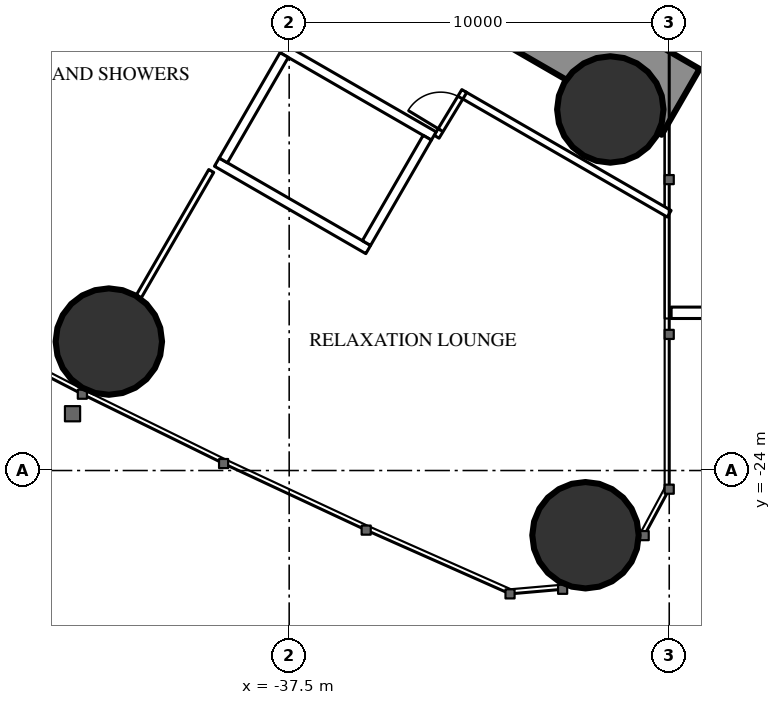
"""IFC4 building model, lengths in metres.
Left out: names, types, materials, properties, quantities, classifications, styles, units other than length and angle.
Written with IfcOpenShell. Run it as: python <this file> out.ifc"""

import sys

from ifc_helpers import new_model, si_unit, direction, frame, frame_2d, origin, origin_2d, place, context, subcontext, project, spatial, rectangle, hollow_circle, extrude, element, fill, save


model = new_model("IFC4")
c1 = context("Model", 3, precision=1e-05, world=origin(), true_north=direction((0.0, 1.0)))
c2 = subcontext(c1, "Body", "Model", "MODEL_VIEW")
j1 = project(units=[si_unit("LENGTHUNIT", "METRE"), si_unit("PLANEANGLEUNIT", "RADIAN")], contexts=[c1])
p1 = place(None, origin())
s1 = spatial("IfcSite", under=j1, at=p1, CompositionType="ELEMENT")
p2 = place(p1, origin())
s2 = spatial("IfcBuilding", under=s1, at=p2, CompositionType="ELEMENT")
p3 = place(p2, frame((0.0, 0.0, 12.6)))
s3 = spatial("IfcBuildingStorey", under=s2, at=p3, CompositionType="ELEMENT", Elevation=12.6)
for number, where, z_axis, x_axis in (
    (1, (-29.703, -25.703, 0.0), (0.0, 0.0, 1.0), (1.0, 0.0, 0.0)),
    (2, (-29.05, -14.5, 0.0), (0.0, 0.0, 1.0), (1.0, 0.0, 0.0)),
    (3, (-42.245, -20.607, 0.0), (0.0, 0.0, 1.0), (1.0, 0.0, 0.0)),
):
    element("IfcColumn", number, at=place(p3, frame(where, z_axis=z_axis, x_axis=x_axis)), inside=s3, PredefinedType="COLUMN", context=c2, shape_type="SweptSolid", body=[
        extrude(hollow_circle(Radius=1.4, WallThickness=0.12, at=origin_2d()), origin(), (0.0, 0.0, 1.0), 5.4),
    ])
p4 = place(p3, frame((-27.2, -14.3, 0.0), z_axis=(0.0, 0.0, 1.0), x_axis=(-0.866024044937, 0.500002353585, 0.0)))
e4 = element("IfcWall", 4, at=p4, inside=s3, PredefinedType="SHEAR", context=c2, shape_type="SweptSolid", body=[
    extrude(rectangle(XDim=27.533, YDim=2.0, at=frame_2d((13.767, 0.0))), origin(), (0.0, 0.0, 1.0), 5.4),
])
p5 = place(p4, frame((4.6, 0.0, 0.0)))
e5 = element("IfcOpeningElement", 5, at=p5, cuts=e4, PredefinedType="OPENING", context=c2, shape_type="SweptSolid", body=[
    extrude(rectangle(XDim=1.0, YDim=2.2, at=frame_2d((0.5, 1.1))), frame((0.0, 1.01, 0.0), z_axis=(0.0, -1.0, 0.0), x_axis=(1.0, 0.0, 0.0)), (0.0, 0.0, 1.0), 2.02),
])
p6 = place(p4, frame((13.395, 0.0, 0.0)))
e6 = element("IfcOpeningElement", 6, at=p6, cuts=e4, PredefinedType="OPENING", context=c2, shape_type="SweptSolid", body=[
    extrude(rectangle(XDim=1.8, YDim=2.2, at=frame_2d((0.9, 1.1))), frame((0.0, 1.01, 0.0), z_axis=(0.0, -1.0, 0.0), x_axis=(1.0, 0.0, 0.0)), (0.0, 0.0, 1.0), 2.02),
])
p7 = place(p3, frame((-27.45, -19.85, 0.0), z_axis=(0.0, 0.0, 1.0), x_axis=(1.0, 0.0, 0.0)))
e7 = element("IfcWall", 7, at=p7, inside=s3, PredefinedType="PARAPET", context=c2, shape_type="SweptSolid", body=[
    extrude(rectangle(XDim=1.55, YDim=0.3, at=frame_2d((0.775, 0.0))), origin(), (0.0, 0.0, 1.0), 1.1),
])
p8 = place(p3, frame((-39.551, -16.118, 0.0), z_axis=(0.0, 0.0, 1.0), x_axis=(-0.499986503906, -0.866033195618, 0.0)))
e8 = element("IfcWall", 8, at=p8, inside=s3, PredefinedType="PARTITIONING", context=c2, shape_type="SweptSolid", body=[
    extrude(rectangle(XDim=3.815, YDim=0.15, at=frame_2d((1.907, 0.0))), origin(), (0.0, 0.0, 1.0), 5.15),
])
p9 = place(p3, frame((-27.5, -17.244, 0.0), z_axis=(0.0, 0.0, 1.0), x_axis=(-0.866027347857, 0.499996632752, 0.0)))
e9 = element("IfcWall", 9, at=p9, inside=s3, PredefinedType="PARTITIONING", context=c2, shape_type="SweptSolid", body=[
    extrude(rectangle(XDim=6.269, YDim=0.2, at=frame_2d((3.135, 0.0))), origin(), (0.0, 0.0, 1.0), 4.25),
])
p10 = place(p3, frame((-33.621, -15.218, 0.0), z_axis=(0.0, 0.0, 1.0), x_axis=(0.518424923641, 0.855123148177, 0.0)))
e10 = element("IfcWall", 10, at=p10, inside=s3, PredefinedType="PARTITIONING", context=c2, shape_type="SweptSolid", body=[
    extrude(rectangle(XDim=1.405, YDim=0.15, at=frame_2d((0.703, 0.0))), origin(), (0.0, 0.0, 1.0), 5.15),
])
p11 = place(p10, frame((0.203, 0.0, 0.0)))
e11 = element("IfcOpeningElement", 11, at=p11, cuts=e10, PredefinedType="OPENING", context=c2, shape_type="SweptSolid", body=[
    extrude(rectangle(XDim=1.0, YDim=2.2, at=frame_2d((0.5, 1.1))), frame((0.0, 0.085, 0.0), z_axis=(0.0, -1.0, 0.0), x_axis=(1.0, 0.0, 0.0)), (0.0, 0.0, 1.0), 0.17),
])
p12 = place(p3, frame((-33.696, -15.197, 0.0), z_axis=(0.0, 0.0, 1.0), x_axis=(-0.865976953817, 0.500083908417, 0.0)))
e12 = element("IfcWall", 12, at=p12, inside=s3, PredefinedType="PARTITIONING", context=c2, shape_type="SweptSolid", body=[
    extrude(rectangle(XDim=4.599, YDim=0.25, at=frame_2d((2.3, 0.0))), origin(), (0.0, 0.0, 1.0), 5.15),
])
p13 = place(p3, frame((-35.42, -18.186, 0.0), z_axis=(0.0, 0.0, 1.0), x_axis=(-0.865990227814, 0.50006092162, 0.0)))
e13 = element("IfcWall", 13, at=p13, inside=s3, PredefinedType="PARTITIONING", context=c2, shape_type="SweptSolid", body=[
    extrude(rectangle(XDim=4.6, YDim=0.25, at=frame_2d((2.3, 0.0))), origin(), (0.0, 0.0, 1.0), 5.15),
])
p14 = place(p3, frame((-33.866, -15.243, 0.0), z_axis=(0.0, 0.0, 1.0), x_axis=(-0.499929347863, -0.866066190972, 0.0)))
e14 = element("IfcWall", 14, at=p14, inside=s3, PredefinedType="PARTITIONING", context=c2, shape_type="SweptSolid", body=[
    extrude(rectangle(XDim=3.201, YDim=0.25, at=frame_2d((1.6, 0.0))), origin(), (0.0, 0.0, 1.0), 5.15),
])
p15 = place(p3, frame((-37.633, -13.068, 0.0), z_axis=(0.0, 0.0, 1.0), x_axis=(-0.499872130319, -0.866099216793, 0.0)))
e15 = element("IfcWall", 15, at=p15, inside=s3, PredefinedType="PARTITIONING", context=c2, shape_type="SweptSolid", body=[
    extrude(rectangle(XDim=3.2, YDim=0.25, at=frame_2d((1.6, 0.0))), origin(), (0.0, 0.0, 1.0), 5.15),
])
p16 = place(p11, origin())
e16 = element("IfcDoor", 16, at=p16, inside=s3, OperationType="SINGLE_SWING_LEFT", PredefinedType="DOOR", context=c2, shape_type="SweptSolid", body=[
    extrude(rectangle(XDim=1.0, YDim=2.2, at=frame_2d((0.5, 1.1))), frame((0.0, 0.025, 0.0), z_axis=(0.0, -1.0, 0.0), x_axis=(1.0, 0.0, 0.0)), (0.0, 0.0, 1.0), 0.05),
])
fill(e11, e16)
save(model, sys.argv[1])
